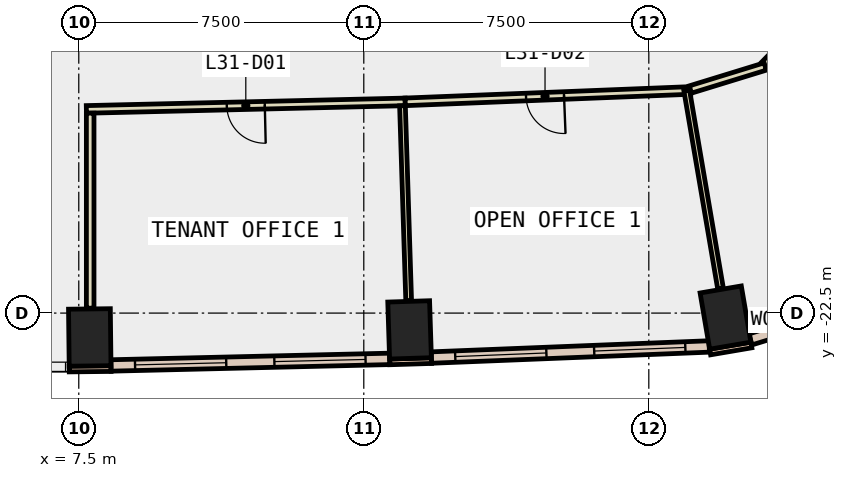
"""IFC4 building model, lengths in metres.
Left out: names, types, materials, properties, quantities, classifications, styles, units other than length and angle.
Written with IfcOpenShell. Run it as: python <this file> out.ifc"""

import sys

from ifc_helpers import new_model, si_unit, direction, frame, frame_2d, origin, origin_2d, place, context, subcontext, project, spatial, rectangle, extrude, element, fill, save


model = new_model("IFC4")
c1 = context("Model", 3, precision=1e-05, world=origin(), true_north=direction((0.0, 1.0)))
c2 = subcontext(c1, "Body", "Model", "MODEL_VIEW")
j1 = project(units=[si_unit("LENGTHUNIT", "METRE"), si_unit("PLANEANGLEUNIT", "RADIAN")], contexts=[c1])
p1 = place(None, origin())
s1 = spatial("IfcSite", under=j1, at=p1, CompositionType="ELEMENT")
p2 = place(p1, origin())
s2 = spatial("IfcBuilding", under=s1, at=p2, CompositionType="ELEMENT")
p3 = place(p2, frame((0.0, 0.0, 142.4)))
s3 = spatial("IfcBuildingStorey", under=s2, at=p3, CompositionType="ELEMENT", Elevation=142.4)
for number, where, z_axis, x_axis in (
    (1, (7.789, -23.141, -0.4), (0.0, 0.0, 1.0), (1.0, 0.012, 0.0)),
    (2, (16.205, -22.942, -0.4), (0.0, 0.0, 1.0), (0.999, 0.032, 0.0)),
    (3, (24.518, -22.618, -0.4), (0.0, 0.0, 1.0), (0.986, 0.168, 0.0)),
):
    element("IfcColumn", number, at=place(p3, frame(where, z_axis=z_axis, x_axis=x_axis)), inside=s3, PredefinedType="COLUMN", context=c2, shape_type="SweptSolid", body=[
        extrude(rectangle(XDim=1.1, YDim=1.5, at=origin_2d()), origin(), (0.0, 0.0, 1.0), 4.2),
    ])
p4 = place(p3, frame((7.249, -23.972, 0.0), z_axis=(0.0, 0.0, 1.0), x_axis=(0.999940879068, 0.010873746799, 0.0)))
e4 = element("IfcWall", 4, at=p4, inside=s3, PredefinedType="STANDARD", context=c2, shape_type="SweptSolid", body=[
    extrude(rectangle(XDim=1.1, YDim=0.15, at=frame_2d((0.55, 0.0))), origin(), (0.0, 0.0, 1.0), 3.8),
])
p5 = place(p3, frame((15.682, -23.784, 0.0), z_axis=(0.0, 0.0, 1.0), x_axis=(0.999523702549, 0.030860460829, 0.0)))
e5 = element("IfcWall", 5, at=p5, inside=s3, PredefinedType="STANDARD", context=c2, shape_type="SweptSolid", body=[
    extrude(rectangle(XDim=1.1, YDim=0.15, at=frame_2d((0.55, 0.0))), origin(), (0.0, 0.0, 1.0), 3.8),
])
p6 = place(p3, frame((24.114, -23.524, 0.0), z_axis=(0.0, 0.0, 1.0), x_axis=(0.985800082077, 0.167923191299, 0.0)))
e6 = element("IfcWall", 6, at=p6, inside=s3, PredefinedType="STANDARD", context=c2, shape_type="SweptSolid", body=[
    extrude(rectangle(XDim=1.101, YDim=0.15, at=frame_2d((0.55, 0.0))), origin(), (0.0, 0.0, 1.0), 3.8),
])
p7 = place(p3, frame((8.347, -23.878, 0.0), z_axis=(0.0, 0.0, 1.0), x_axis=(0.999722302867, 0.023565168146, 0.0)))
e7 = element("IfcWall", 7, at=p7, inside=s3, PredefinedType="STANDARD", context=c2, shape_type="SweptSolid", body=[
    extrude(rectangle(XDim=7.335, YDim=0.3, at=frame_2d((3.667, 0.0))), origin(), (0.0, 0.0, 1.0), 3.8),
])
p8 = place(p7, frame((0.634, 0.0, 0.9)))
e8 = element("IfcOpeningElement", 8, at=p8, cuts=e7, PredefinedType="OPENING", context=c2, shape_type="SweptSolid", body=[
    extrude(rectangle(XDim=2.4, YDim=2.6, at=frame_2d((1.2, 1.3))), frame((0.0, 0.16, 0.0), z_axis=(0.0, -1.0, 0.0), x_axis=(1.0, 0.0, 0.0)), (0.0, 0.0, 1.0), 0.32),
])
p9 = place(p7, frame((4.301, 0.0, 0.9)))
e9 = element("IfcOpeningElement", 9, at=p9, cuts=e7, PredefinedType="OPENING", context=c2, shape_type="SweptSolid", body=[
    extrude(rectangle(XDim=2.4, YDim=2.6, at=frame_2d((1.2, 1.3))), frame((0.0, 0.16, 0.0), z_axis=(0.0, -1.0, 0.0), x_axis=(1.0, 0.0, 0.0)), (0.0, 0.0, 1.0), 0.32),
])
p10 = place(p3, frame((16.778, -23.67, 0.0), z_axis=(0.0, 0.0, 1.0), x_axis=(0.999203621229, 0.039901420066, 0.0)))
e10 = element("IfcWall", 10, at=p10, inside=s3, PredefinedType="STANDARD", context=c2, shape_type="SweptSolid", body=[
    extrude(rectangle(XDim=7.318, YDim=0.3, at=frame_2d((3.659, 0.0))), origin(), (0.0, 0.0, 1.0), 3.8),
])
p11 = place(p10, frame((0.629, 0.0, 0.9)))
e11 = element("IfcOpeningElement", 11, at=p11, cuts=e10, PredefinedType="OPENING", context=c2, shape_type="SweptSolid", body=[
    extrude(rectangle(XDim=2.4, YDim=2.6, at=frame_2d((1.2, 1.3))), frame((0.0, 0.16, 0.0), z_axis=(0.0, -1.0, 0.0), x_axis=(1.0, 0.0, 0.0)), (0.0, 0.0, 1.0), 0.32),
])
p12 = place(p10, frame((4.288, 0.0, 0.9)))
e12 = element("IfcOpeningElement", 12, at=p12, cuts=e10, PredefinedType="OPENING", context=c2, shape_type="SweptSolid", body=[
    extrude(rectangle(XDim=2.4, YDim=2.6, at=frame_2d((1.2, 1.3))), frame((0.0, 0.16, 0.0), z_axis=(0.0, -1.0, 0.0), x_axis=(1.0, 0.0, 0.0)), (0.0, 0.0, 1.0), 0.32),
])
p13 = place(p3, frame((25.173, -23.193, 0.0), z_axis=(0.0, 0.0, 1.0), x_axis=(0.955874475611, 0.293775402094, 0.0)))
e13 = element("IfcWall", 13, at=p13, inside=s3, PredefinedType="STANDARD", context=c2, shape_type="SweptSolid", body=[
    extrude(rectangle(XDim=3.537, YDim=0.3, at=frame_2d((1.769, 0.0))), origin(), (0.0, 0.0, 1.0), 3.8),
])
p14 = place(p13, frame((1.069, 0.0, 0.9)))
e14 = element("IfcOpeningElement", 14, at=p14, cuts=e13, PredefinedType="OPENING", context=c2, shape_type="SweptSolid", body=[
    extrude(rectangle(XDim=1.4, YDim=2.6, at=frame_2d((0.7, 1.3))), frame((0.0, 0.16, 0.0), z_axis=(0.0, -1.0, 0.0), x_axis=(1.0, 0.0, 0.0)), (0.0, 0.0, 1.0), 0.32),
])
p15 = place(p3, frame((16.09, -16.943, 0.0), z_axis=(0.0, 0.0, 1.0), x_axis=(-0.999721662071, -0.023592337425, 0.0)))
e15 = element("IfcWall", 15, at=p15, inside=s3, PredefinedType="PARTITIONING", context=c2, shape_type="SweptSolid", body=[
    extrude(rectangle(XDim=8.393, YDim=0.2, at=frame_2d((4.196, 0.0))), origin(), (0.0, 0.0, 1.0), 3.8),
])
p16 = place(p15, frame((3.696, 0.0, 0.0)))
e16 = element("IfcOpeningElement", 16, at=p16, cuts=e15, PredefinedType="OPENING", context=c2, shape_type="SweptSolid", body=[
    extrude(rectangle(XDim=1.0, YDim=2.1, at=frame_2d((0.5, 1.05))), frame((0.0, 0.11, 0.0), z_axis=(0.0, -1.0, 0.0), x_axis=(1.0, 0.0, 0.0)), (0.0, 0.0, 1.0), 0.22),
])
p17 = place(p3, frame((23.598, -16.642, 0.0), z_axis=(0.0, 0.0, 1.0), x_axis=(-0.999203655486, -0.039900562205, 0.0)))
e17 = element("IfcWall", 17, at=p17, inside=s3, PredefinedType="PARTITIONING", context=c2, shape_type="SweptSolid", body=[
    extrude(rectangle(XDim=7.514, YDim=0.2, at=frame_2d((3.757, 0.0))), origin(), (0.0, 0.0, 1.0), 3.8),
])
p18 = place(p17, frame((3.332, 0.0, 0.0)))
e18 = element("IfcOpeningElement", 18, at=p18, cuts=e17, PredefinedType="OPENING", context=c2, shape_type="SweptSolid", body=[
    extrude(rectangle(XDim=1.0, YDim=2.1, at=frame_2d((0.5, 1.05))), frame((0.0, 0.11, 0.0), z_axis=(0.0, -1.0, 0.0), x_axis=(1.0, 0.0, 0.0)), (0.0, 0.0, 1.0), 0.22),
])
p19 = place(p3, frame((26.373, -15.114, 0.0), z_axis=(0.0, 0.0, 1.0), x_axis=(-0.698272822523, -0.715831729756, 0.0)))
e19 = element("IfcWall", 19, at=p19, inside=s3, PredefinedType="PARTITIONING", context=c2, shape_type="SweptSolid", body=[
    extrude(rectangle(XDim=1.196, YDim=0.2, at=frame_2d((0.598, 0.0))), origin(), (0.0, 0.0, 1.0), 3.8),
])
p20 = place(p3, frame((25.563, -16.012, 0.0), z_axis=(0.0, 0.0, 1.0), x_axis=(-0.955896815358, -0.293702704087, 0.0)))
e20 = element("IfcWall", 20, at=p20, inside=s3, PredefinedType="PARTITIONING", context=c2, shape_type="SweptSolid", body=[
    extrude(rectangle(XDim=2.06, YDim=0.2, at=frame_2d((1.03, 0.0))), origin(), (0.0, 0.0, 1.0), 3.8),
])
p21 = place(p3, frame((7.8, -17.239, 0.0), z_axis=(0.0, 0.0, 1.0), x_axis=(0.0, -1.0, 0.0)))
e21 = element("IfcWall", 21, at=p21, inside=s3, PredefinedType="PARTITIONING", context=c2, shape_type="SweptSolid", body=[
    extrude(rectangle(XDim=5.132, YDim=0.2, at=frame_2d((2.566, 0.0))), origin(), (0.0, 0.0, 1.0), 3.8),
])
p22 = place(p3, frame((16.018, -17.045, 0.0), z_axis=(0.0, 0.0, 1.0), x_axis=(0.031744385759, -0.999496019988, 0.0)))
e22 = element("IfcWall", 22, at=p22, inside=s3, PredefinedType="PARTITIONING", context=c2, shape_type="SweptSolid", body=[
    extrude(rectangle(XDim=5.13, YDim=0.15, at=frame_2d((2.565, 0.0))), origin(), (0.0, 0.0, 1.0), 3.8),
])
p23 = place(p3, frame((23.498, -16.646, 0.0), z_axis=(0.0, 0.0, 1.0), x_axis=(0.168275674737, -0.985739974482, 0.0)))
e23 = element("IfcWall", 23, at=p23, inside=s3, PredefinedType="PARTITIONING", context=c2, shape_type="SweptSolid", body=[
    extrude(rectangle(XDim=5.288, YDim=0.15, at=frame_2d((2.644, 0.0))), origin(), (0.0, 0.0, 1.0), 3.8),
])
p24 = place(p8, origin())
e24 = element("IfcWindow", 24, at=p24, inside=s3, PartitioningType="SINGLE_PANEL", PredefinedType="WINDOW", context=c2, shape_type="SweptSolid", body=[
    extrude(rectangle(XDim=2.4, YDim=2.6, at=frame_2d((1.2, 1.3))), frame((0.0, 0.03, 0.0), z_axis=(0.0, -1.0, 0.0), x_axis=(1.0, 0.0, 0.0)), (0.0, 0.0, 1.0), 0.06),
])
fill(e8, e24)
p25 = place(p9, origin())
e25 = element("IfcWindow", 25, at=p25, inside=s3, PartitioningType="SINGLE_PANEL", PredefinedType="WINDOW", context=c2, shape_type="SweptSolid", body=[
    extrude(rectangle(XDim=2.4, YDim=2.6, at=frame_2d((1.2, 1.3))), frame((0.0, 0.03, 0.0), z_axis=(0.0, -1.0, 0.0), x_axis=(1.0, 0.0, 0.0)), (0.0, 0.0, 1.0), 0.06),
])
fill(e9, e25)
p26 = place(p11, origin())
e26 = element("IfcWindow", 26, at=p26, inside=s3, PartitioningType="SINGLE_PANEL", PredefinedType="WINDOW", context=c2, shape_type="SweptSolid", body=[
    extrude(rectangle(XDim=2.4, YDim=2.6, at=frame_2d((1.2, 1.3))), frame((0.0, 0.03, 0.0), z_axis=(0.0, -1.0, 0.0), x_axis=(1.0, 0.0, 0.0)), (0.0, 0.0, 1.0), 0.06),
])
fill(e11, e26)
p27 = place(p12, origin())
e27 = element("IfcWindow", 27, at=p27, inside=s3, PartitioningType="SINGLE_PANEL", PredefinedType="WINDOW", context=c2, shape_type="SweptSolid", body=[
    extrude(rectangle(XDim=2.4, YDim=2.6, at=frame_2d((1.2, 1.3))), frame((0.0, 0.03, 0.0), z_axis=(0.0, -1.0, 0.0), x_axis=(1.0, 0.0, 0.0)), (0.0, 0.0, 1.0), 0.06),
])
fill(e12, e27)
p28 = place(p16, origin())
e28 = element("IfcDoor", 28, at=p28, inside=s3, OperationType="SINGLE_SWING_RIGHT", PredefinedType="DOOR", context=c2, shape_type="SweptSolid", body=[
    extrude(rectangle(XDim=1.0, YDim=2.1, at=frame_2d((0.5, 1.05))), frame((0.0, 0.025, 0.0), z_axis=(0.0, -1.0, 0.0), x_axis=(1.0, 0.0, 0.0)), (0.0, 0.0, 1.0), 0.05),
])
fill(e16, e28)
p29 = place(p18, origin())
e29 = element("IfcDoor", 29, at=p29, inside=s3, OperationType="SINGLE_SWING_LEFT", PredefinedType="DOOR", context=c2, shape_type="SweptSolid", body=[
    extrude(rectangle(XDim=1.0, YDim=2.1, at=frame_2d((0.5, 1.05))), frame((0.0, 0.025, 0.0), z_axis=(0.0, -1.0, 0.0), x_axis=(1.0, 0.0, 0.0)), (0.0, 0.0, 1.0), 0.05),
])
fill(e18, e29)
save(model, sys.argv[1])
